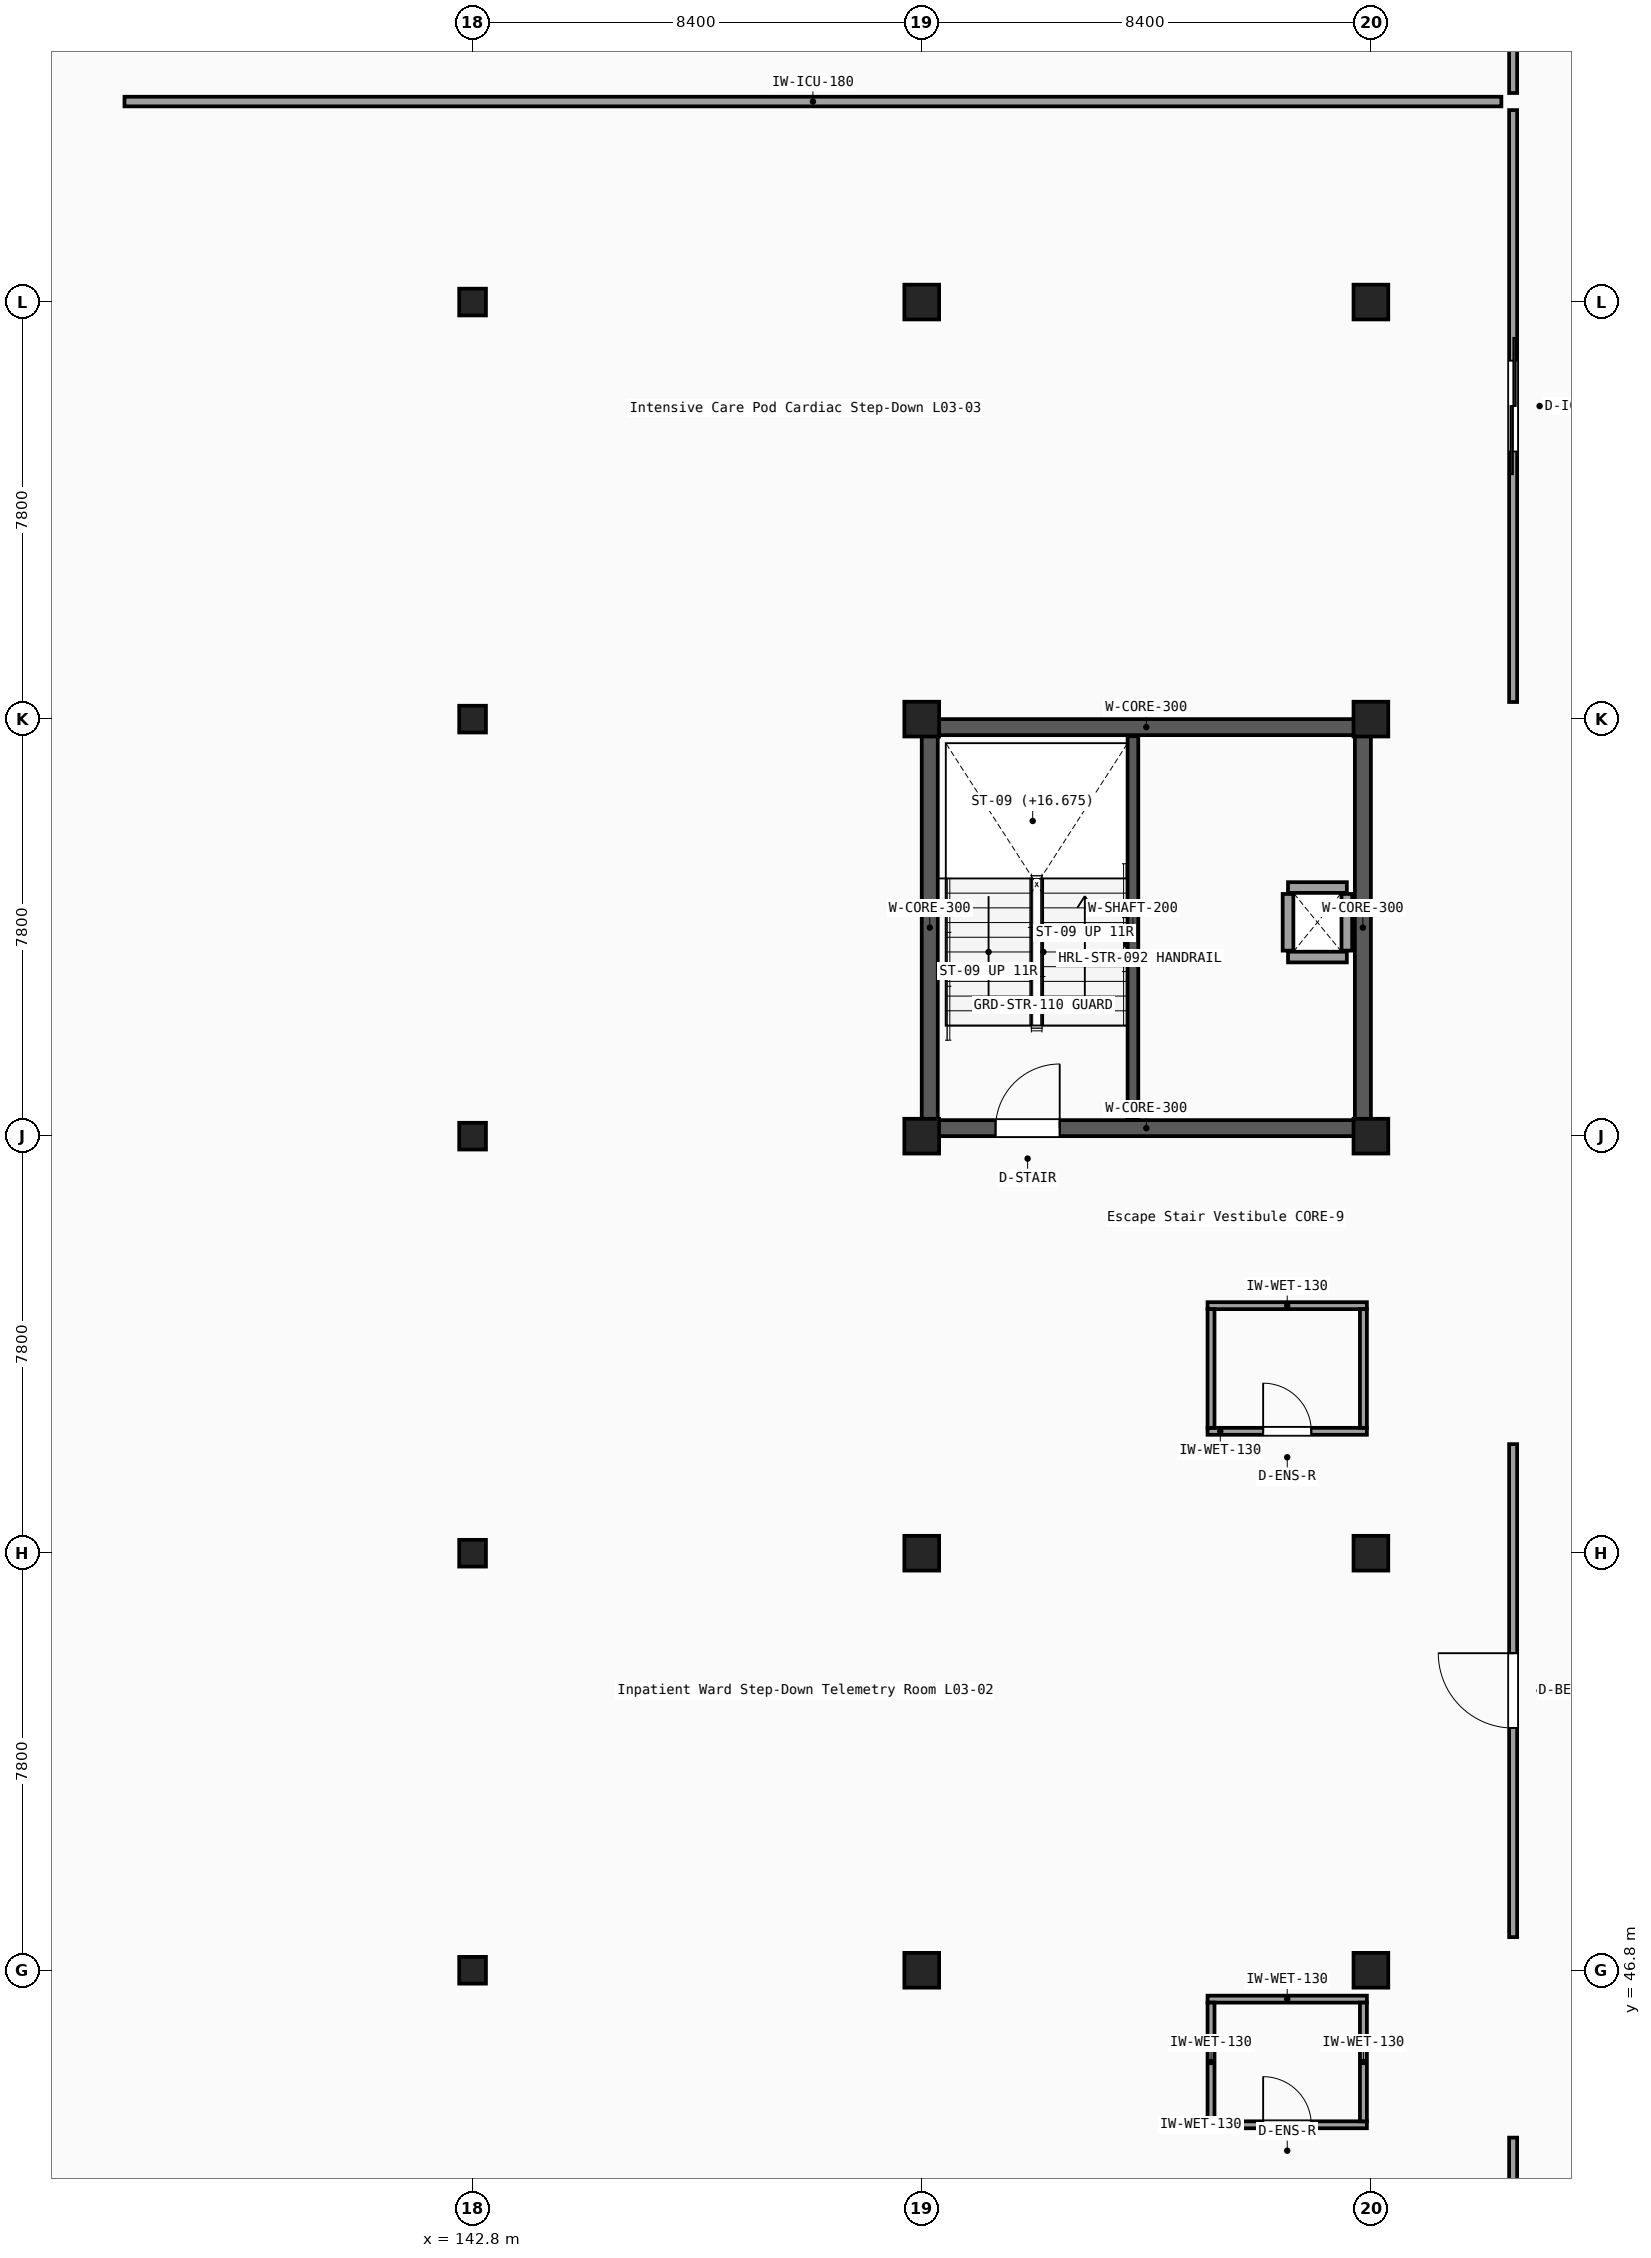
"""IFC4 building model, lengths in metres.
Left out: names, types, materials, properties, quantities, classifications, styles, units other than length and angle.
Written with IfcOpenShell. Run it as: python <this file> out.ifc"""

import sys

from ifc_helpers import new_model, si_unit, direction, frame, frame_2d, origin, origin_2d, place, context, subcontext, project, spatial, rectangle, i_section, extrude, element, fill, save


model = new_model("IFC4")
c1 = context("Model", 3, precision=1e-05, world=origin(), true_north=direction((0.0, 1.0)))
c2 = subcontext(c1, "Body", "Model", "MODEL_VIEW")
j1 = project(units=[si_unit("LENGTHUNIT", "METRE"), si_unit("PLANEANGLEUNIT", "RADIAN")], contexts=[c1])
p1 = place(None, origin())
s1 = spatial("IfcSite", under=j1, at=p1, CompositionType="ELEMENT")
p2 = place(p1, origin())
s2 = spatial("IfcBuilding", under=s1, at=p2, CompositionType="ELEMENT")
p3 = place(p2, frame((0.0, 0.0, 14.85)))
s3 = spatial("IfcBuildingStorey", under=s2, at=p3, CompositionType="ELEMENT", Elevation=14.85)
for number, where, z_axis, x_axis in (
    (1, (142.8, 46.8, 0.0), (0.0, 0.0, 1.0), (1.0, 0.0, 0.0)),
    (2, (142.8, 54.6, 0.0), (0.0, 0.0, 1.0), (1.0, 0.0, 0.0)),
    (3, (142.8, 62.4, 0.0), (0.0, 0.0, 1.0), (1.0, 0.0, 0.0)),
    (4, (142.8, 70.2, 0.0), (0.0, 0.0, 1.0), (1.0, 0.0, 0.0)),
    (5, (142.8, 78.0, 0.0), (0.0, 0.0, 1.0), (1.0, 0.0, 0.0)),
):
    element("IfcColumn", number, at=place(p3, frame(where, z_axis=z_axis, x_axis=x_axis)), inside=s3, PredefinedType="COLUMN", context=c2, shape_type="SweptSolid", body=[
        extrude(i_section(OverallWidth=0.3, OverallDepth=0.5, WebThickness=0.014, FlangeThickness=0.028, FilletRadius=0.027, at=origin_2d()), origin(), (0.0, 0.0, 1.0), 4.05),
    ])
for number, where, z_axis, x_axis in (
    (6, (151.2, 46.8, 0.0), (0.0, 0.0, 1.0), (1.0, 0.0, 0.0)),
    (7, (151.2, 54.6, 0.0), (0.0, 0.0, 1.0), (1.0, 0.0, 0.0)),
    (8, (151.2, 62.4, 0.0), (0.0, 0.0, 1.0), (1.0, 0.0, 0.0)),
    (9, (151.2, 70.2, 0.0), (0.0, 0.0, 1.0), (1.0, 0.0, 0.0)),
    (10, (151.2, 78.0, 0.0), (0.0, 0.0, 1.0), (1.0, 0.0, 0.0)),
    (11, (159.6, 46.8, 0.0), (0.0, 0.0, 1.0), (1.0, 0.0, 0.0)),
    (12, (159.6, 54.6, 0.0), (0.0, 0.0, 1.0), (1.0, 0.0, 0.0)),
    (13, (159.6, 62.4, 0.0), (0.0, 0.0, 1.0), (1.0, 0.0, 0.0)),
    (14, (159.6, 70.2, 0.0), (0.0, 0.0, 1.0), (1.0, 0.0, 0.0)),
    (15, (159.6, 78.0, 0.0), (0.0, 0.0, 1.0), (1.0, 0.0, 0.0)),
):
    element("IfcColumn", number, at=place(p3, frame(where, z_axis=z_axis, x_axis=x_axis)), inside=s3, PredefinedType="COLUMN", context=c2, shape_type="SweptSolid", body=[
        extrude(rectangle(XDim=0.65, YDim=0.65, at=origin_2d()), origin(), (0.0, 0.0, 1.0), 4.05),
    ])
p4 = place(p3, frame((151.2, 62.55, 0.0), z_axis=(0.0, 0.0, 1.0), x_axis=(1.0, 0.0, 0.0)))
e16 = element("IfcWall", 16, at=p4, inside=s3, PredefinedType="SHEAR", context=c2, shape_type="SweptSolid", body=[
    extrude(rectangle(XDim=8.4, YDim=0.3, at=frame_2d((4.2, 0.0))), origin(), (0.0, 0.0, 1.0), 3.81),
])
p5 = place(p4, frame((1.38, 0.0, 0.0)))
e17 = element("IfcOpeningElement", 17, at=p5, cuts=e16, PredefinedType="OPENING", context=c2, shape_type="SweptSolid", body=[
    extrude(rectangle(XDim=1.2, YDim=2.15, at=frame_2d((0.6, 1.075))), frame((0.0, 0.16, 0.0), z_axis=(0.0, -1.0, 0.0), x_axis=(1.0, 0.0, 0.0)), (0.0, 0.0, 1.0), 0.32),
])
p6 = place(p3, frame((151.2, 70.05, 0.0), z_axis=(0.0, 0.0, 1.0), x_axis=(1.0, 0.0, 0.0)))
e18 = element("IfcWall", 18, at=p6, inside=s3, PredefinedType="SHEAR", context=c2, shape_type="SweptSolid", body=[
    extrude(rectangle(XDim=8.4, YDim=0.3, at=frame_2d((4.2, 0.0))), origin(), (0.0, 0.0, 1.0), 3.81),
])
for number, where, z_axis, x_axis in (
    (19, (151.35, 62.7, 0.0), (0.0, 0.0, 1.0), (0.0, 1.0, 0.0)),
    (20, (159.45, 62.7, 0.0), (0.0, 0.0, 1.0), (0.0, 1.0, 0.0)),
):
    element("IfcWall", number, at=place(p3, frame(where, z_axis=z_axis, x_axis=x_axis)), inside=s3, PredefinedType="SHEAR", context=c2, shape_type="SweptSolid", body=[
        extrude(rectangle(XDim=7.2, YDim=0.3, at=frame_2d((3.6, 0.0))), origin(), (0.0, 0.0, 1.0), 3.81),
    ])
p7 = place(p3, frame((155.15, 62.72, 0.0), z_axis=(0.0, 0.0, 1.0), x_axis=(0.0, 1.0, 0.0)))
e21 = element("IfcWall", 21, at=p7, inside=s3, PredefinedType="SHEAR", context=c2, shape_type="SweptSolid", body=[
    extrude(rectangle(XDim=7.16, YDim=0.2, at=frame_2d((3.58, 0.0))), origin(), (0.0, 0.0, 1.0), 3.81),
])
for number, where, z_axis, x_axis in (
    (22, (158.05, 65.75, 0.0), (0.0, 0.0, 1.0), (1.0, 0.0, 0.0)),
    (23, (158.05, 67.05, 0.0), (0.0, 0.0, 1.0), (1.0, 0.0, 0.0)),
):
    element("IfcWall", number, at=place(p3, frame(where, z_axis=z_axis, x_axis=x_axis)), inside=s3, PredefinedType="PARTITIONING", context=c2, shape_type="SweptSolid", body=[
        extrude(rectangle(XDim=1.1, YDim=0.2, at=frame_2d((0.55, 0.0))), origin(), (0.0, 0.0, 1.0), 3.35),
    ])
for number, where, z_axis, x_axis in (
    (24, (158.05, 65.87, 0.0), (0.0, 0.0, 1.0), (0.0, 1.0, 0.0)),
    (25, (159.15, 65.87, 0.0), (0.0, 0.0, 1.0), (0.0, 1.0, 0.0)),
):
    element("IfcWall", number, at=place(p3, frame(where, z_axis=z_axis, x_axis=x_axis)), inside=s3, PredefinedType="PARTITIONING", context=c2, shape_type="SweptSolid", body=[
        extrude(rectangle(XDim=1.06, YDim=0.2, at=frame_2d((0.53, 0.0))), origin(), (0.0, 0.0, 1.0), 3.35),
    ])
p8 = place(p3, frame((162.26, 39.62, 0.0), z_axis=(0.0, 0.0, 1.0), x_axis=(0.0, 1.0, 0.0)))
e26 = element("IfcWall", 26, at=p8, inside=s3, PredefinedType="PARTITIONING", context=c2, shape_type="SweptSolid", body=[
    extrude(rectangle(XDim=4.05, YDim=0.15, at=frame_2d((2.025, 0.0))), origin(), (0.0, 0.0, 1.0), 3.77),
])
p9 = place(p8, frame((1.325, 0.0, 0.0)))
e27 = element("IfcOpeningElement", 27, at=p9, cuts=e26, PredefinedType="OPENING", context=c2, shape_type="SweptSolid", body=[
    extrude(rectangle(XDim=1.4, YDim=2.2, at=frame_2d((0.7, 1.1))), frame((0.0, 0.085, 0.0), z_axis=(0.0, -1.0, 0.0), x_axis=(1.0, 0.0, 0.0)), (0.0, 0.0, 1.0), 0.17),
])
p10 = place(p3, frame((156.545, 43.91, 0.0), z_axis=(0.0, 0.0, 1.0), x_axis=(1.0, 0.0, 0.0)))
e28 = element("IfcWall", 28, at=p10, inside=s3, PredefinedType="PARTITIONING", context=c2, shape_type="SweptSolid", body=[
    extrude(rectangle(XDim=2.98, YDim=0.13, at=frame_2d((1.49, 0.0))), origin(), (0.0, 0.0, 1.0), 3.48),
])
p11 = place(p10, frame((1.04, 0.0, 0.0)))
e29 = element("IfcOpeningElement", 29, at=p11, cuts=e28, PredefinedType="OPENING", context=c2, shape_type="SweptSolid", body=[
    extrude(rectangle(XDim=0.9, YDim=2.1, at=frame_2d((0.45, 1.05))), frame((0.0, 0.075, 0.0), z_axis=(0.0, -1.0, 0.0), x_axis=(1.0, 0.0, 0.0)), (0.0, 0.0, 1.0), 0.15),
])
p12 = place(p3, frame((156.545, 46.26, 0.0), z_axis=(0.0, 0.0, 1.0), x_axis=(1.0, 0.0, 0.0)))
e30 = element("IfcWall", 30, at=p12, inside=s3, PredefinedType="PARTITIONING", context=c2, shape_type="SweptSolid", body=[
    extrude(rectangle(XDim=2.98, YDim=0.13, at=frame_2d((1.49, 0.0))), origin(), (0.0, 0.0, 1.0), 3.48),
])
p13 = place(p3, frame((156.61, 43.975, 0.0), z_axis=(0.0, 0.0, 1.0), x_axis=(0.0, 1.0, 0.0)))
e31 = element("IfcWall", 31, at=p13, inside=s3, PredefinedType="PARTITIONING", context=c2, shape_type="SweptSolid", body=[
    extrude(rectangle(XDim=2.22, YDim=0.13, at=frame_2d((1.11, 0.0))), origin(), (0.0, 0.0, 1.0), 3.77),
])
p14 = place(p3, frame((159.46, 43.975, 0.0), z_axis=(0.0, 0.0, 1.0), x_axis=(0.0, 1.0, 0.0)))
e32 = element("IfcWall", 32, at=p14, inside=s3, PredefinedType="PARTITIONING", context=c2, shape_type="SweptSolid", body=[
    extrude(rectangle(XDim=2.22, YDim=0.13, at=frame_2d((1.11, 0.0))), origin(), (0.0, 0.0, 1.0), 3.48),
])
p15 = place(p3, frame((162.26, 47.42, 0.0), z_axis=(0.0, 0.0, 1.0), x_axis=(0.0, 1.0, 0.0)))
e33 = element("IfcWall", 33, at=p15, inside=s3, PredefinedType="PARTITIONING", context=c2, shape_type="SweptSolid", body=[
    extrude(rectangle(XDim=9.22, YDim=0.15, at=frame_2d((4.61, 0.0))), origin(), (0.0, 0.0, 1.0), 3.35),
])
p16 = place(p15, frame((3.91, 0.0, 0.0)))
e34 = element("IfcOpeningElement", 34, at=p16, cuts=e33, PredefinedType="OPENING", context=c2, shape_type="SweptSolid", body=[
    extrude(rectangle(XDim=1.4, YDim=2.2, at=frame_2d((0.7, 1.1))), frame((0.0, 0.085, 0.0), z_axis=(0.0, -1.0, 0.0), x_axis=(1.0, 0.0, 0.0)), (0.0, 0.0, 1.0), 0.17),
])
p17 = place(p3, frame((156.545, 56.88, 0.0), z_axis=(0.0, 0.0, 1.0), x_axis=(1.0, 0.0, 0.0)))
e35 = element("IfcWall", 35, at=p17, inside=s3, PredefinedType="PARTITIONING", context=c2, shape_type="SweptSolid", body=[
    extrude(rectangle(XDim=2.98, YDim=0.13, at=frame_2d((1.49, 0.0))), origin(), (0.0, 0.0, 1.0), 3.48),
])
p18 = place(p17, frame((1.04, 0.0, 0.0)))
e36 = element("IfcOpeningElement", 36, at=p18, cuts=e35, PredefinedType="OPENING", context=c2, shape_type="SweptSolid", body=[
    extrude(rectangle(XDim=0.9, YDim=2.1, at=frame_2d((0.45, 1.05))), frame((0.0, 0.075, 0.0), z_axis=(0.0, -1.0, 0.0), x_axis=(1.0, 0.0, 0.0)), (0.0, 0.0, 1.0), 0.15),
])
p19 = place(p3, frame((156.545, 59.23, 0.0), z_axis=(0.0, 0.0, 1.0), x_axis=(1.0, 0.0, 0.0)))
e37 = element("IfcWall", 37, at=p19, inside=s3, PredefinedType="PARTITIONING", context=c2, shape_type="SweptSolid", body=[
    extrude(rectangle(XDim=2.98, YDim=0.13, at=frame_2d((1.49, 0.0))), origin(), (0.0, 0.0, 1.0), 3.48),
])
p20 = place(p3, frame((156.61, 56.945, 0.0), z_axis=(0.0, 0.0, 1.0), x_axis=(0.0, 1.0, 0.0)))
e38 = element("IfcWall", 38, at=p20, inside=s3, PredefinedType="PARTITIONING", context=c2, shape_type="SweptSolid", body=[
    extrude(rectangle(XDim=2.22, YDim=0.13, at=frame_2d((1.11, 0.0))), origin(), (0.0, 0.0, 1.0), 3.77),
])
p21 = place(p3, frame((159.46, 56.945, 0.0), z_axis=(0.0, 0.0, 1.0), x_axis=(0.0, 1.0, 0.0)))
e39 = element("IfcWall", 39, at=p21, inside=s3, PredefinedType="PARTITIONING", context=c2, shape_type="SweptSolid", body=[
    extrude(rectangle(XDim=2.22, YDim=0.13, at=frame_2d((1.11, 0.0))), origin(), (0.0, 0.0, 1.0), 3.48),
])
p22 = place(p3, frame((162.26, 70.52, 0.0), z_axis=(0.0, 0.0, 1.0), x_axis=(0.0, 1.0, 0.0)))
e40 = element("IfcWall", 40, at=p22, inside=s3, PredefinedType="PARTITIONING", context=c2, shape_type="SweptSolid", body=[
    extrude(rectangle(XDim=11.07, YDim=0.15, at=frame_2d((5.535, 0.0))), origin(), (0.0, 0.0, 1.0), 3.35),
])
p23 = place(p22, frame((4.685, 0.0, 0.0)))
e41 = element("IfcOpeningElement", 41, at=p23, cuts=e40, PredefinedType="OPENING", context=c2, shape_type="SweptSolid", body=[
    extrude(rectangle(XDim=1.7, YDim=2.3, at=frame_2d((0.85, 1.15))), frame((0.0, 0.085, 0.0), z_axis=(0.0, -1.0, 0.0), x_axis=(1.0, 0.0, 0.0)), (0.0, 0.0, 1.0), 0.17),
])
p24 = place(p3, frame((136.29, 81.75, 0.0), z_axis=(0.0, 0.0, 1.0), x_axis=(1.0, 0.0, 0.0)))
e42 = element("IfcWall", 42, at=p24, inside=s3, PredefinedType="PARTITIONING", context=c2, shape_type="SweptSolid", body=[
    extrude(rectangle(XDim=25.75, YDim=0.18, at=frame_2d((12.875, 0.0))), origin(), (0.0, 0.0, 1.0), 3.48),
])
p25 = place(p3, frame((162.26, 81.91, 0.0), z_axis=(0.0, 0.0, 1.0), x_axis=(0.0, 1.0, 0.0)))
e43 = element("IfcWall", 43, at=p25, inside=s3, PredefinedType="PARTITIONING", context=c2, shape_type="SweptSolid", body=[
    extrude(rectangle(XDim=11.07, YDim=0.15, at=frame_2d((5.535, 0.0))), origin(), (0.0, 0.0, 1.0), 3.45),
])
p26 = place(p25, frame((5.01, 0.0, 0.0)))
e44 = element("IfcOpeningElement", 44, at=p26, cuts=e43, PredefinedType="OPENING", context=c2, shape_type="SweptSolid", body=[
    extrude(rectangle(XDim=1.05, YDim=2.15, at=frame_2d((0.525, 1.075))), frame((0.0, 0.085, 0.0), z_axis=(0.0, -1.0, 0.0), x_axis=(1.0, 0.0, 0.0)), (0.0, 0.0, 1.0), 0.17),
])
p27 = place(p5, origin())
e45 = element("IfcDoor", 45, at=p27, inside=s3, OperationType="SINGLE_SWING_RIGHT", PredefinedType="DOOR", context=c2, shape_type="SweptSolid", body=[
    extrude(rectangle(XDim=1.2, YDim=2.15, at=frame_2d((0.6, 1.075))), frame((0.0, 0.025, 0.0), z_axis=(0.0, -1.0, 0.0), x_axis=(1.0, 0.0, 0.0)), (0.0, 0.0, 1.0), 0.05),
])
fill(e17, e45)
p28 = place(p11, origin())
e46 = element("IfcDoor", 46, at=p28, inside=s3, OperationType="SINGLE_SWING_LEFT", PredefinedType="DOOR", context=c2, shape_type="SweptSolid", body=[
    extrude(rectangle(XDim=0.9, YDim=2.1, at=frame_2d((0.45, 1.05))), frame((0.0, 0.025, 0.0), z_axis=(0.0, -1.0, 0.0), x_axis=(1.0, 0.0, 0.0)), (0.0, 0.0, 1.0), 0.05),
])
fill(e29, e46)
p29 = place(p16, origin())
e47 = element("IfcDoor", 47, at=p29, inside=s3, OperationType="SINGLE_SWING_RIGHT", PredefinedType="DOOR", context=c2, shape_type="SweptSolid", body=[
    extrude(rectangle(XDim=1.4, YDim=2.2, at=frame_2d((0.7, 1.1))), frame((0.0, 0.025, 0.0), z_axis=(0.0, -1.0, 0.0), x_axis=(1.0, 0.0, 0.0)), (0.0, 0.0, 1.0), 0.05),
])
fill(e34, e47)
p30 = place(p18, origin())
e48 = element("IfcDoor", 48, at=p30, inside=s3, OperationType="SINGLE_SWING_LEFT", PredefinedType="DOOR", context=c2, shape_type="SweptSolid", body=[
    extrude(rectangle(XDim=0.9, YDim=2.1, at=frame_2d((0.45, 1.05))), frame((0.0, 0.025, 0.0), z_axis=(0.0, -1.0, 0.0), x_axis=(1.0, 0.0, 0.0)), (0.0, 0.0, 1.0), 0.05),
])
fill(e36, e48)
p31 = place(p23, origin())
e49 = element("IfcDoor", 49, at=p31, inside=s3, OperationType="DOUBLE_DOOR_SLIDING", PredefinedType="DOOR", context=c2, shape_type="SweptSolid", body=[
    extrude(rectangle(XDim=1.7, YDim=2.3, at=frame_2d((0.85, 1.15))), frame((0.0, 0.025, 0.0), z_axis=(0.0, -1.0, 0.0), x_axis=(1.0, 0.0, 0.0)), (0.0, 0.0, 1.0), 0.05),
])
fill(e41, e49)
save(model, sys.argv[1])
